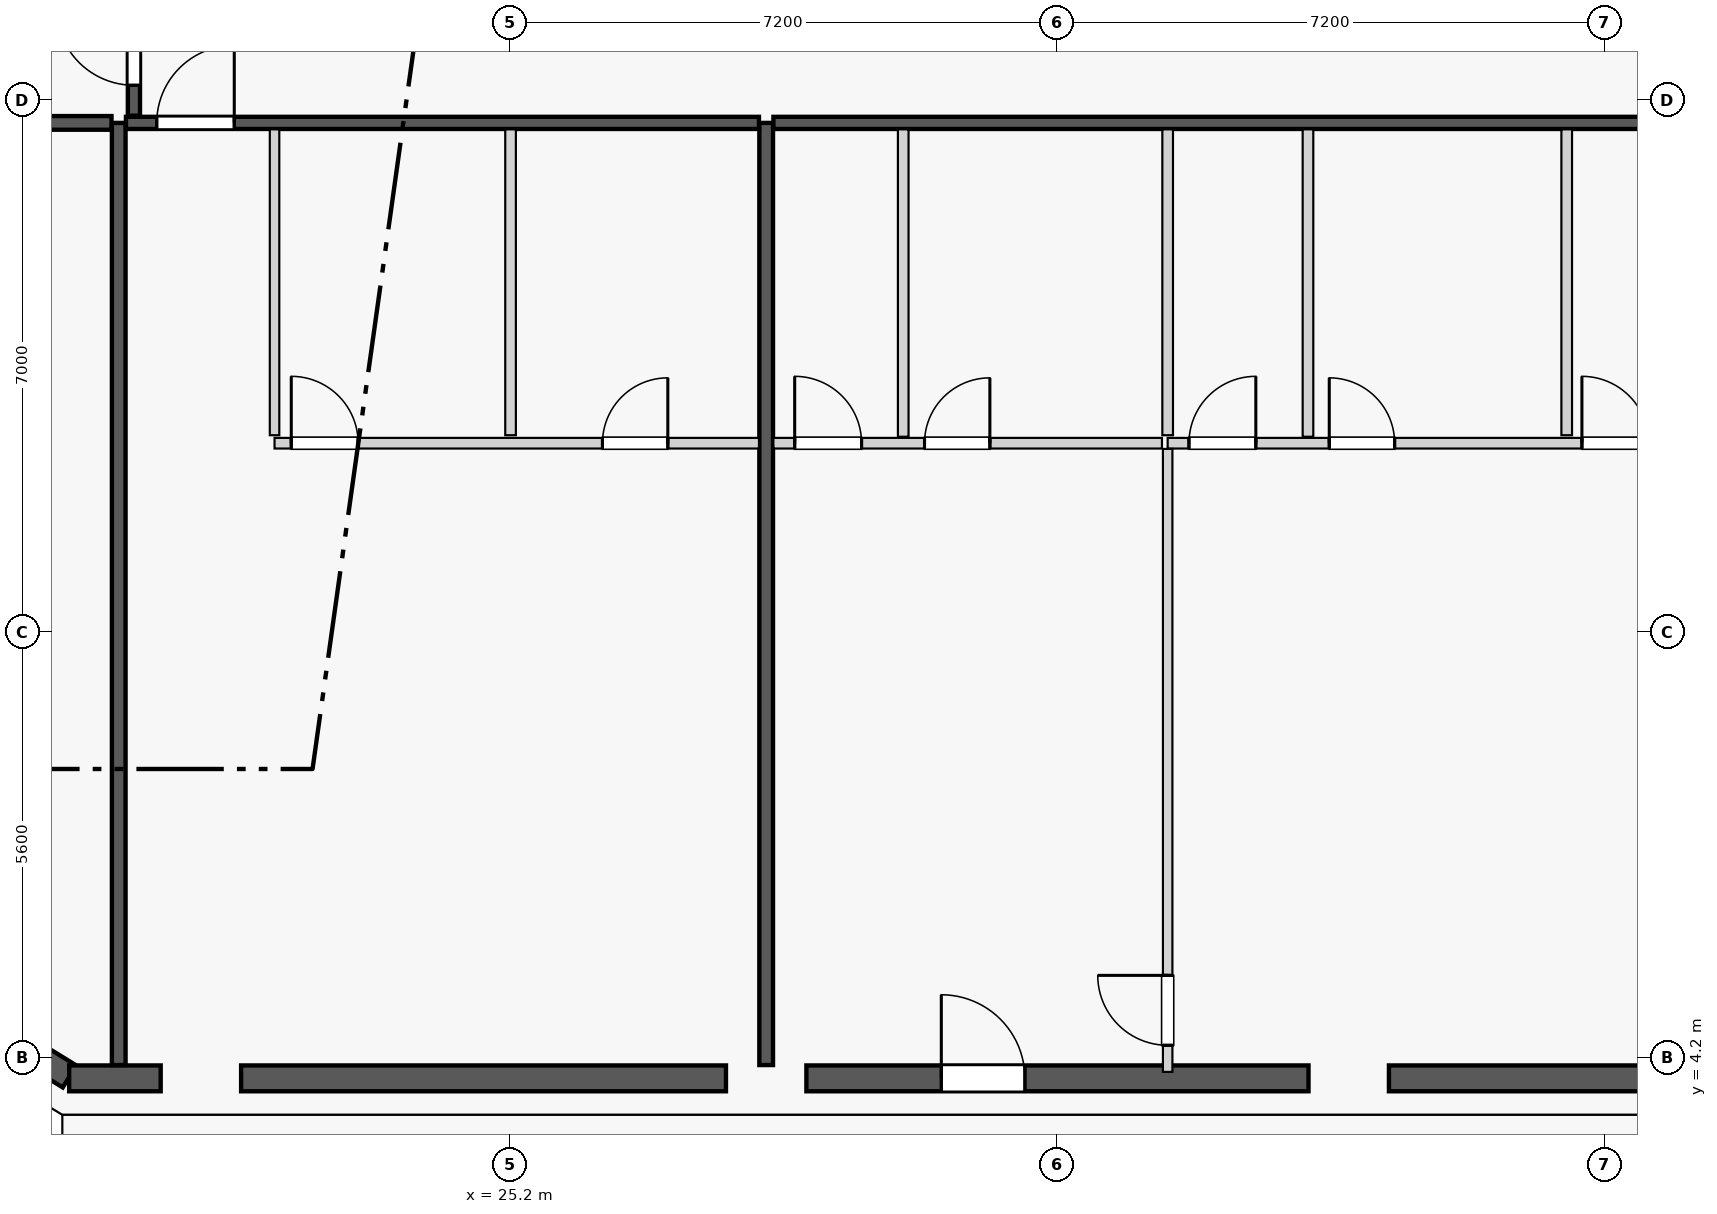
"""IFC4 building model, lengths in metres.
Left out: names, types, materials, properties, quantities, classifications, styles, units other than length and angle.
Written with IfcOpenShell. Run it as: python <this file> out.ifc"""

import sys

from ifc_helpers import new_model, si_unit, direction, frame, frame_2d, origin, origin_2d, place, context, subcontext, project, spatial, rectangle, extrude, element, fill, save


model = new_model("IFC4")
c1 = context("Model", 3, precision=1e-05, world=origin(), true_north=direction((0.0, 1.0)))
c2 = subcontext(c1, "Body", "Model", "MODEL_VIEW")
j1 = project(units=[si_unit("LENGTHUNIT", "METRE"), si_unit("PLANEANGLEUNIT", "RADIAN")], contexts=[c1])
p1 = place(None, origin())
s1 = spatial("IfcSite", under=j1, at=p1, CompositionType="ELEMENT")
p2 = place(p1, origin())
s2 = spatial("IfcBuilding", under=s1, at=p2, CompositionType="ELEMENT")
p3 = place(p2, frame((0.0, 0.0, 112.6)))
s3 = spatial("IfcBuildingStorey", under=s2, at=p3, CompositionType="ELEMENT", Elevation=112.6)
for number, where, z_axis, x_axis in (
    (1, (21.131, 3.939, 0.0), (0.0, 0.0, 1.0), (1.0, 0.0, 0.0)),
    (2, (28.568, 3.992, 0.0), (0.0, 0.0, 1.0), (1.0, 0.0, 0.0)),
    (3, (36.232, 3.992, 0.0), (0.0, 0.0, 1.0), (1.0, 0.0, 0.0)),
):
    element("IfcColumn", number, at=place(p3, frame(where, z_axis=z_axis, x_axis=x_axis)), inside=s3, PredefinedType="COLUMN", context=c2, shape_type="SweptSolid", body=[
        extrude(rectangle(XDim=1.05, YDim=1.05, at=origin_2d()), origin(), (0.0, 0.0, 1.0), 3.55),
    ])
p4 = place(p3, frame((19.141, 5.093, 0.0), z_axis=(0.0, 0.0, 1.0), x_axis=(0.865160173452, -0.501495637342, 0.0)))
e4 = element("IfcColumn", 4, at=p4, inside=s3, PredefinedType="PILASTER", context=c2, shape_type="SweptSolid", body=[
    extrude(rectangle(XDim=0.5, YDim=0.35, at=origin_2d()), origin(), (0.0, 0.0, 1.0), 3.55),
])
p5 = place(p3, frame((17.829, 4.923, 0.0), z_axis=(0.0, 0.0, 1.0), x_axis=(0.851798915137, -0.523868884523, 0.0)))
e5 = element("IfcWall", 5, at=p5, inside=s3, PredefinedType="STANDARD", context=c2, shape_type="SweptSolid", body=[
    extrude(rectangle(XDim=1.848, YDim=0.34, at=frame_2d((0.924, 0.0))), origin(), (0.0, 0.0, 1.0), 3.34),
])
p6 = place(p3, frame((19.398, 3.93, 0.0), z_axis=(0.0, 0.0, 1.0), x_axis=(1.0, 0.0, 0.0)))
e6 = element("IfcWall", 6, at=p6, inside=s3, PredefinedType="STANDARD", context=c2, shape_type="SweptSolid", body=[
    extrude(rectangle(XDim=1.204, YDim=0.34, at=frame_2d((0.602, 0.0))), origin(), (0.0, 0.0, 1.0), 3.34),
])
p7 = place(p3, frame((21.66, 3.93, 0.0), z_axis=(0.0, 0.0, 1.0), x_axis=(1.0, 0.0, 0.0)))
e7 = element("IfcWall", 7, at=p7, inside=s3, PredefinedType="STANDARD", context=c2, shape_type="SweptSolid", body=[
    extrude(rectangle(XDim=6.379, YDim=0.34, at=frame_2d((3.189, 0.0))), origin(), (0.0, 0.0, 1.0), 2.797),
])
p8 = place(p7, frame((2.64, 0.0, 0.75)))
e8 = element("IfcOpeningElement", 8, at=p8, cuts=e7, PredefinedType="OPENING", context=c2, shape_type="SweptSolid", body=[
    extrude(rectangle(XDim=1.1, YDim=1.897, at=frame_2d((0.55, 0.948))), frame((0.0, 0.18, 0.0), z_axis=(0.0, -1.0, 0.0), x_axis=(1.0, 0.0, 0.0)), (0.0, 0.0, 1.0), 0.36),
])
p9 = place(p3, frame((29.097, 3.93, 0.0), z_axis=(0.0, 0.0, 1.0), x_axis=(1.0, 0.0, 0.0)))
e9 = element("IfcWall", 9, at=p9, inside=s3, PredefinedType="STANDARD", context=c2, shape_type="SweptSolid", body=[
    extrude(rectangle(XDim=6.606, YDim=0.34, at=frame_2d((3.303, 0.0))), origin(), (0.0, 0.0, 1.0), 2.797),
])
p10 = place(p9, frame((1.775, 0.0, 0.0)))
e10 = element("IfcOpeningElement", 10, at=p10, cuts=e9, PredefinedType="OPENING", context=c2, shape_type="SweptSolid", body=[
    extrude(rectangle(XDim=1.1, YDim=2.25, at=frame_2d((0.55, 1.125))), frame((0.0, 0.18, 0.0), z_axis=(0.0, -1.0, 0.0), x_axis=(1.0, 0.0, 0.0)), (0.0, 0.0, 1.0), 0.36),
])
p11 = place(p9, frame((5.186, 0.0, 0.75)))
e11 = element("IfcOpeningElement", 11, at=p11, cuts=e9, PredefinedType="OPENING", context=c2, shape_type="SweptSolid", body=[
    extrude(rectangle(XDim=1.1, YDim=1.897, at=frame_2d((0.55, 0.948))), frame((0.0, 0.18, 0.0), z_axis=(0.0, -1.0, 0.0), x_axis=(1.0, 0.0, 0.0)), (0.0, 0.0, 1.0), 0.36),
])
p12 = place(p3, frame((36.761, 3.93, 0.0), z_axis=(0.0, 0.0, 1.0), x_axis=(1.0, 0.0, 0.0)))
e12 = element("IfcWall", 12, at=p12, inside=s3, PredefinedType="STANDARD", context=c2, shape_type="SweptSolid", body=[
    extrude(rectangle(XDim=6.379, YDim=0.34, at=frame_2d((3.189, 0.0))), origin(), (0.0, 0.0, 1.0), 2.797),
])
p13 = place(p12, frame((2.639, 0.0, 0.75)))
e13 = element("IfcOpeningElement", 13, at=p13, cuts=e12, PredefinedType="OPENING", context=c2, shape_type="SweptSolid", body=[
    extrude(rectangle(XDim=1.1, YDim=1.897, at=frame_2d((0.55, 0.948))), frame((0.0, 0.18, 0.0), z_axis=(0.0, -1.0, 0.0), x_axis=(1.0, 0.0, 0.0)), (0.0, 0.0, 1.0), 0.36),
])
p14 = place(p3, frame((20.05, 4.105, 0.0), z_axis=(0.0, 0.0, 1.0), x_axis=(0.0, 1.0, 0.0)))
e14 = element("IfcWall", 14, at=p14, inside=s3, PredefinedType="PARTITIONING", context=c2, shape_type="SweptSolid", body=[
    extrude(rectangle(XDim=12.395, YDim=0.18, at=frame_2d((6.198, 0.0))), origin(), (0.0, 0.0, 1.0), 3.34),
])
p15 = place(p3, frame((28.568, 4.105, 0.0), z_axis=(0.0, 0.0, 1.0), x_axis=(0.0, 1.0, 0.0)))
e15 = element("IfcWall", 15, at=p15, inside=s3, PredefinedType="PARTITIONING", context=c2, shape_type="SweptSolid", body=[
    extrude(rectangle(XDim=12.395, YDim=0.18, at=frame_2d((6.198, 0.0))), origin(), (0.0, 0.0, 1.0), 2.722),
])
p16 = place(p3, frame((20.145, 16.5, 0.0), z_axis=(0.0, 0.0, 1.0), x_axis=(1.0, 0.0, 0.0)))
e16 = element("IfcWall", 16, at=p16, inside=s3, PredefinedType="PARTITIONING", context=c2, shape_type="SweptSolid", body=[
    extrude(rectangle(XDim=8.328, YDim=0.16, at=frame_2d((4.164, 0.0))), origin(), (0.0, 0.0, 1.0), 3.34),
])
p17 = place(p16, frame((0.405, 0.0, 0.0)))
e17 = element("IfcOpeningElement", 17, at=p17, cuts=e16, PredefinedType="OPENING", context=c2, shape_type="SweptSolid", body=[
    extrude(rectangle(XDim=1.02, YDim=2.25, at=frame_2d((0.51, 1.125))), frame((0.0, 0.09, 0.0), z_axis=(0.0, -1.0, 0.0), x_axis=(1.0, 0.0, 0.0)), (0.0, 0.0, 1.0), 0.18),
])
p18 = place(p3, frame((22.1, 12.391, 0.0), z_axis=(0.0, 0.0, 1.0), x_axis=(0.0, 1.0, 0.0)))
e18 = element("IfcWall", 18, at=p18, inside=s3, PredefinedType="PARTITIONING", context=c2, shape_type="SweptSolid", body=[
    extrude(rectangle(XDim=4.024, YDim=0.125, at=frame_2d((2.012, 0.0))), origin(), (0.0, 0.0, 1.0), 2.722),
])
p19 = place(p3, frame((22.1, 12.286, 0.0), z_axis=(0.0, 0.0, 1.0), x_axis=(1.0, 0.0, 0.0)))
e19 = element("IfcWall", 19, at=p19, inside=s3, PredefinedType="PLUMBINGWALL", context=c2, shape_type="SweptSolid", body=[
    extrude(rectangle(XDim=6.373, YDim=0.14, at=frame_2d((3.187, 0.0))), origin(), (0.0, 0.0, 1.0), 3.34),
])
p20 = place(p19, frame((4.314, 0.0, 0.0)))
e20 = element("IfcOpeningElement", 20, at=p20, cuts=e19, PredefinedType="OPENING", context=c2, shape_type="SweptSolid", body=[
    extrude(rectangle(XDim=0.86, YDim=2.1, at=frame_2d((0.43, 1.05))), frame((0.0, 0.08, 0.0), z_axis=(0.0, -1.0, 0.0), x_axis=(1.0, 0.0, 0.0)), (0.0, 0.0, 1.0), 0.16),
])
p21 = place(p19, frame((0.22, 0.0, 0.0)))
e21 = element("IfcOpeningElement", 21, at=p21, cuts=e19, PredefinedType="OPENING", context=c2, shape_type="SweptSolid", body=[
    extrude(rectangle(XDim=0.88, YDim=2.15, at=frame_2d((0.44, 1.075))), frame((0.0, 0.08, 0.0), z_axis=(0.0, -1.0, 0.0), x_axis=(1.0, 0.0, 0.0)), (0.0, 0.0, 1.0), 0.16),
])
p22 = place(p3, frame((25.205, 12.391, 0.0), z_axis=(0.0, 0.0, 1.0), x_axis=(0.0, 1.0, 0.0)))
e22 = element("IfcWall", 22, at=p22, inside=s3, PredefinedType="PLUMBINGWALL", context=c2, shape_type="SweptSolid", body=[
    extrude(rectangle(XDim=4.024, YDim=0.14, at=frame_2d((2.012, 0.0))), origin(), (0.0, 0.0, 1.0), 3.34),
])
p23 = place(p3, frame((28.663, 16.5, 0.0), z_axis=(0.0, 0.0, 1.0), x_axis=(1.0, 0.0, 0.0)))
e23 = element("IfcWall", 23, at=p23, inside=s3, PredefinedType="PARTITIONING", context=c2, shape_type="SweptSolid", body=[
    extrude(rectangle(XDim=15.992, YDim=0.16, at=frame_2d((7.996, 0.0))), origin(), (0.0, 0.0, 1.0), 3.34),
])
p24 = place(p23, frame((14.087, 0.0, 0.0)))
e24 = element("IfcOpeningElement", 24, at=p24, cuts=e23, PredefinedType="OPENING", context=c2, shape_type="SweptSolid", body=[
    extrude(rectangle(XDim=1.02, YDim=2.25, at=frame_2d((0.51, 1.125))), frame((0.0, 0.09, 0.0), z_axis=(0.0, -1.0, 0.0), x_axis=(1.0, 0.0, 0.0)), (0.0, 0.0, 1.0), 0.18),
])
p25 = place(p3, frame((33.85, 12.286, 0.0), z_axis=(0.0, 0.0, 1.0), x_axis=(1.0, 0.0, 0.0)))
e25 = element("IfcWall", 25, at=p25, inside=s3, PredefinedType="PLUMBINGWALL", context=c2, shape_type="SweptSolid", body=[
    extrude(rectangle(XDim=8.65, YDim=0.14, at=frame_2d((4.325, 0.0))), origin(), (0.0, 0.0, 1.0), 3.34),
])
p26 = place(p25, frame((0.28, 0.0, 0.0)))
e26 = element("IfcOpeningElement", 26, at=p26, cuts=e25, PredefinedType="OPENING", context=c2, shape_type="SweptSolid", body=[
    extrude(rectangle(XDim=0.88, YDim=2.15, at=frame_2d((0.44, 1.075))), frame((0.0, 0.08, 0.0), z_axis=(0.0, -1.0, 0.0), x_axis=(1.0, 0.0, 0.0)), (0.0, 0.0, 1.0), 0.16),
])
p27 = place(p25, frame((2.126, 0.0, 0.0)))
e27 = element("IfcOpeningElement", 27, at=p27, cuts=e25, PredefinedType="OPENING", context=c2, shape_type="SweptSolid", body=[
    extrude(rectangle(XDim=0.86, YDim=2.1, at=frame_2d((0.43, 1.05))), frame((0.0, 0.08, 0.0), z_axis=(0.0, -1.0, 0.0), x_axis=(1.0, 0.0, 0.0)), (0.0, 0.0, 1.0), 0.16),
])
p28 = place(p25, frame((5.45, 0.0, 0.0)))
e28 = element("IfcOpeningElement", 28, at=p28, cuts=e25, PredefinedType="OPENING", context=c2, shape_type="SweptSolid", body=[
    extrude(rectangle(XDim=0.88, YDim=2.15, at=frame_2d((0.44, 1.075))), frame((0.0, 0.08, 0.0), z_axis=(0.0, -1.0, 0.0), x_axis=(1.0, 0.0, 0.0)), (0.0, 0.0, 1.0), 0.16),
])
p29 = place(p3, frame((28.663, 12.286, 0.0), z_axis=(0.0, 0.0, 1.0), x_axis=(1.0, 0.0, 0.0)))
e29 = element("IfcWall", 29, at=p29, inside=s3, PredefinedType="PLUMBINGWALL", context=c2, shape_type="SweptSolid", body=[
    extrude(rectangle(XDim=5.112, YDim=0.14, at=frame_2d((2.556, 0.0))), origin(), (0.0, 0.0, 1.0), 3.34),
])
p30 = place(p29, frame((0.28, 0.0, 0.0)))
e30 = element("IfcOpeningElement", 30, at=p30, cuts=e29, PredefinedType="OPENING", context=c2, shape_type="SweptSolid", body=[
    extrude(rectangle(XDim=0.88, YDim=2.15, at=frame_2d((0.44, 1.075))), frame((0.0, 0.08, 0.0), z_axis=(0.0, -1.0, 0.0), x_axis=(1.0, 0.0, 0.0)), (0.0, 0.0, 1.0), 0.16),
])
p31 = place(p29, frame((1.988, 0.0, 0.0)))
e31 = element("IfcOpeningElement", 31, at=p31, cuts=e29, PredefinedType="OPENING", context=c2, shape_type="SweptSolid", body=[
    extrude(rectangle(XDim=0.86, YDim=2.1, at=frame_2d((0.43, 1.05))), frame((0.0, 0.08, 0.0), z_axis=(0.0, -1.0, 0.0), x_axis=(1.0, 0.0, 0.0)), (0.0, 0.0, 1.0), 0.16),
])
for number, where, z_axis, x_axis in (
    (32, (39.1, 12.391, 0.0), (0.0, 0.0, 1.0), (0.0, 1.0, 0.0)),
    (33, (33.85, 12.391, 0.0), (0.0, 0.0, 1.0), (0.0, 1.0, 0.0)),
):
    element("IfcWall", number, at=place(p3, frame(where, z_axis=z_axis, x_axis=x_axis)), inside=s3, PredefinedType="PLUMBINGWALL", context=c2, shape_type="SweptSolid", body=[
        extrude(rectangle(XDim=4.024, YDim=0.14, at=frame_2d((2.012, 0.0))), origin(), (0.0, 0.0, 1.0), 3.34),
    ])
p32 = place(p3, frame((33.85, 4.015, 0.0), z_axis=(0.0, 0.0, 1.0), x_axis=(0.0, 1.0, 0.0)))
e34 = element("IfcWall", 34, at=p32, inside=s3, PredefinedType="PARTITIONING", context=c2, shape_type="SweptSolid", body=[
    extrude(rectangle(XDim=8.196, YDim=0.125, at=frame_2d((4.098, 0.0))), origin(), (0.0, 0.0, 1.0), 3.34),
])
p33 = place(p32, frame((0.35, 0.0, 0.0)))
e35 = element("IfcOpeningElement", 35, at=p33, cuts=e34, PredefinedType="OPENING", context=c2, shape_type="SweptSolid", body=[
    extrude(rectangle(XDim=0.92, YDim=2.15, at=frame_2d((0.46, 1.075))), frame((0.0, 0.073, 0.0), z_axis=(0.0, -1.0, 0.0), x_axis=(1.0, 0.0, 0.0)), (0.0, 0.0, 1.0), 0.145),
])
for number, where, z_axis, x_axis in (
    (36, (35.696, 12.371, 0.0), (0.0, 0.0, 1.0), (0.0, 1.0, 0.0)),
    (37, (30.371, 12.371, 0.0), (0.0, 0.0, 1.0), (0.0, 1.0, 0.0)),
):
    element("IfcWall", number, at=place(p3, frame(where, z_axis=z_axis, x_axis=x_axis)), inside=s3, PredefinedType="PLUMBINGWALL", context=c2, shape_type="SweptSolid", body=[
        extrude(rectangle(XDim=4.044, YDim=0.14, at=frame_2d((2.022, 0.0))), origin(), (0.0, 0.0, 1.0), 3.34),
    ])
p34 = place(p3, frame((12.185, 16.5, 0.0), z_axis=(0.0, 0.0, 1.0), x_axis=(1.0, 0.0, 0.0)))
e38 = element("IfcWall", 38, at=p34, inside=s3, PredefinedType="PARTITIONING", context=c2, shape_type="SweptSolid", body=[
    extrude(rectangle(XDim=7.77, YDim=0.18, at=frame_2d((3.885, 0.0))), origin(), (0.0, 0.0, 1.0), 3.34),
])
p35 = place(p3, frame((20.25, 16.595, 0.0), z_axis=(0.0, 0.0, 1.0), x_axis=(0.0, 1.0, 0.0)))
e39 = element("IfcWall", 39, at=p35, inside=s3, PredefinedType="PARTITIONING", context=c2, shape_type="SweptSolid", body=[
    extrude(rectangle(XDim=6.39, YDim=0.16, at=frame_2d((3.195, 0.0))), origin(), (0.0, 0.0, 1.0), 3.34),
])
p36 = place(p35, frame((0.4, 0.0, 0.0)))
e40 = element("IfcOpeningElement", 40, at=p36, cuts=e39, PredefinedType="OPENING", context=c2, shape_type="SweptSolid", body=[
    extrude(rectangle(XDim=1.02, YDim=2.25, at=frame_2d((0.51, 1.125))), frame((0.0, 0.09, 0.0), z_axis=(0.0, -1.0, 0.0), x_axis=(1.0, 0.0, 0.0)), (0.0, 0.0, 1.0), 0.18),
])
p37 = place(p8, origin())
e41 = element("IfcWindow", 41, at=p37, inside=s3, PartitioningType="SINGLE_PANEL", PredefinedType="WINDOW", context=c2, shape_type="SweptSolid", body=[
    extrude(rectangle(XDim=1.1, YDim=1.897, at=frame_2d((0.55, 0.948))), frame((0.0, 0.03, 0.0), z_axis=(0.0, -1.0, 0.0), x_axis=(1.0, 0.0, 0.0)), (0.0, 0.0, 1.0), 0.06),
])
fill(e8, e41)
p38 = place(p10, origin())
e42 = element("IfcDoor", 42, at=p38, inside=s3, OperationType="SINGLE_SWING_LEFT", PredefinedType="DOOR", context=c2, shape_type="SweptSolid", body=[
    extrude(rectangle(XDim=1.1, YDim=2.25, at=frame_2d((0.55, 1.125))), frame((0.0, 0.025, 0.0), z_axis=(0.0, -1.0, 0.0), x_axis=(1.0, 0.0, 0.0)), (0.0, 0.0, 1.0), 0.05),
])
fill(e10, e42)
p39 = place(p13, origin())
e43 = element("IfcWindow", 43, at=p39, inside=s3, PartitioningType="SINGLE_PANEL", PredefinedType="WINDOW", context=c2, shape_type="SweptSolid", body=[
    extrude(rectangle(XDim=1.1, YDim=1.897, at=frame_2d((0.55, 0.948))), frame((0.0, 0.03, 0.0), z_axis=(0.0, -1.0, 0.0), x_axis=(1.0, 0.0, 0.0)), (0.0, 0.0, 1.0), 0.06),
])
fill(e13, e43)
p40 = place(p20, origin())
e44 = element("IfcDoor", 44, at=p40, inside=s3, OperationType="SINGLE_SWING_RIGHT", PredefinedType="DOOR", context=c2, shape_type="SweptSolid", body=[
    extrude(rectangle(XDim=0.86, YDim=2.1, at=frame_2d((0.43, 1.05))), frame((0.0, 0.025, 0.0), z_axis=(0.0, -1.0, 0.0), x_axis=(1.0, 0.0, 0.0)), (0.0, 0.0, 1.0), 0.05),
])
fill(e20, e44)
p41 = place(p17, origin())
e45 = element("IfcDoor", 45, at=p41, inside=s3, OperationType="SINGLE_SWING_RIGHT", PredefinedType="DOOR", context=c2, shape_type="SweptSolid", body=[
    extrude(rectangle(XDim=1.02, YDim=2.25, at=frame_2d((0.51, 1.125))), frame((0.0, 0.025, 0.0), z_axis=(0.0, -1.0, 0.0), x_axis=(1.0, 0.0, 0.0)), (0.0, 0.0, 1.0), 0.05),
])
fill(e17, e45)
p42 = place(p21, origin())
e46 = element("IfcDoor", 46, at=p42, inside=s3, OperationType="SINGLE_SWING_LEFT", PredefinedType="DOOR", context=c2, shape_type="SweptSolid", body=[
    extrude(rectangle(XDim=0.88, YDim=2.15, at=frame_2d((0.44, 1.075))), frame((0.0, 0.025, 0.0), z_axis=(0.0, -1.0, 0.0), x_axis=(1.0, 0.0, 0.0)), (0.0, 0.0, 1.0), 0.05),
])
fill(e21, e46)
p43 = place(p26, origin())
e47 = element("IfcDoor", 47, at=p43, inside=s3, OperationType="SINGLE_SWING_RIGHT", PredefinedType="DOOR", context=c2, shape_type="SweptSolid", body=[
    extrude(rectangle(XDim=0.88, YDim=2.15, at=frame_2d((0.44, 1.075))), frame((0.0, 0.025, 0.0), z_axis=(0.0, -1.0, 0.0), x_axis=(1.0, 0.0, 0.0)), (0.0, 0.0, 1.0), 0.05),
])
fill(e26, e47)
p44 = place(p27, origin())
e48 = element("IfcDoor", 48, at=p44, inside=s3, OperationType="SINGLE_SWING_LEFT", PredefinedType="DOOR", context=c2, shape_type="SweptSolid", body=[
    extrude(rectangle(XDim=0.86, YDim=2.1, at=frame_2d((0.43, 1.05))), frame((0.0, 0.025, 0.0), z_axis=(0.0, -1.0, 0.0), x_axis=(1.0, 0.0, 0.0)), (0.0, 0.0, 1.0), 0.05),
])
fill(e27, e48)
p45 = place(p30, origin())
e49 = element("IfcDoor", 49, at=p45, inside=s3, OperationType="SINGLE_SWING_LEFT", PredefinedType="DOOR", context=c2, shape_type="SweptSolid", body=[
    extrude(rectangle(XDim=0.88, YDim=2.15, at=frame_2d((0.44, 1.075))), frame((0.0, 0.025, 0.0), z_axis=(0.0, -1.0, 0.0), x_axis=(1.0, 0.0, 0.0)), (0.0, 0.0, 1.0), 0.05),
])
fill(e30, e49)
p46 = place(p31, origin())
e50 = element("IfcDoor", 50, at=p46, inside=s3, OperationType="SINGLE_SWING_RIGHT", PredefinedType="DOOR", context=c2, shape_type="SweptSolid", body=[
    extrude(rectangle(XDim=0.86, YDim=2.1, at=frame_2d((0.43, 1.05))), frame((0.0, 0.025, 0.0), z_axis=(0.0, -1.0, 0.0), x_axis=(1.0, 0.0, 0.0)), (0.0, 0.0, 1.0), 0.05),
])
fill(e31, e50)
p47 = place(p28, origin())
e51 = element("IfcDoor", 51, at=p47, inside=s3, OperationType="SINGLE_SWING_LEFT", PredefinedType="DOOR", context=c2, shape_type="SweptSolid", body=[
    extrude(rectangle(XDim=0.88, YDim=2.15, at=frame_2d((0.44, 1.075))), frame((0.0, 0.025, 0.0), z_axis=(0.0, -1.0, 0.0), x_axis=(1.0, 0.0, 0.0)), (0.0, 0.0, 1.0), 0.05),
])
fill(e28, e51)
p48 = place(p33, origin())
e52 = element("IfcDoor", 52, at=p48, inside=s3, OperationType="SINGLE_SWING_RIGHT", PredefinedType="DOOR", context=c2, shape_type="SweptSolid", body=[
    extrude(rectangle(XDim=0.92, YDim=2.15, at=frame_2d((0.46, 1.075))), frame((0.0, 0.025, 0.0), z_axis=(0.0, -1.0, 0.0), x_axis=(1.0, 0.0, 0.0)), (0.0, 0.0, 1.0), 0.05),
])
fill(e35, e52)
p49 = place(p36, origin())
e53 = element("IfcDoor", 53, at=p49, inside=s3, OperationType="SINGLE_SWING_RIGHT", PredefinedType="DOOR", context=c2, shape_type="SweptSolid", body=[
    extrude(rectangle(XDim=1.02, YDim=2.25, at=frame_2d((0.51, 1.125))), frame((0.0, 0.025, 0.0), z_axis=(0.0, -1.0, 0.0), x_axis=(1.0, 0.0, 0.0)), (0.0, 0.0, 1.0), 0.05),
])
fill(e40, e53)
p50 = place(p11, origin())
e54 = element("IfcWindow", 54, at=p50, inside=s3, PartitioningType="SINGLE_PANEL", PredefinedType="WINDOW", context=c2, shape_type="SweptSolid", body=[
    extrude(rectangle(XDim=1.1, YDim=1.897, at=frame_2d((0.55, 0.948))), frame((0.0, 0.03, 0.0), z_axis=(0.0, -1.0, 0.0), x_axis=(1.0, 0.0, 0.0)), (0.0, 0.0, 1.0), 0.06),
])
fill(e11, e54)
save(model, sys.argv[1])
